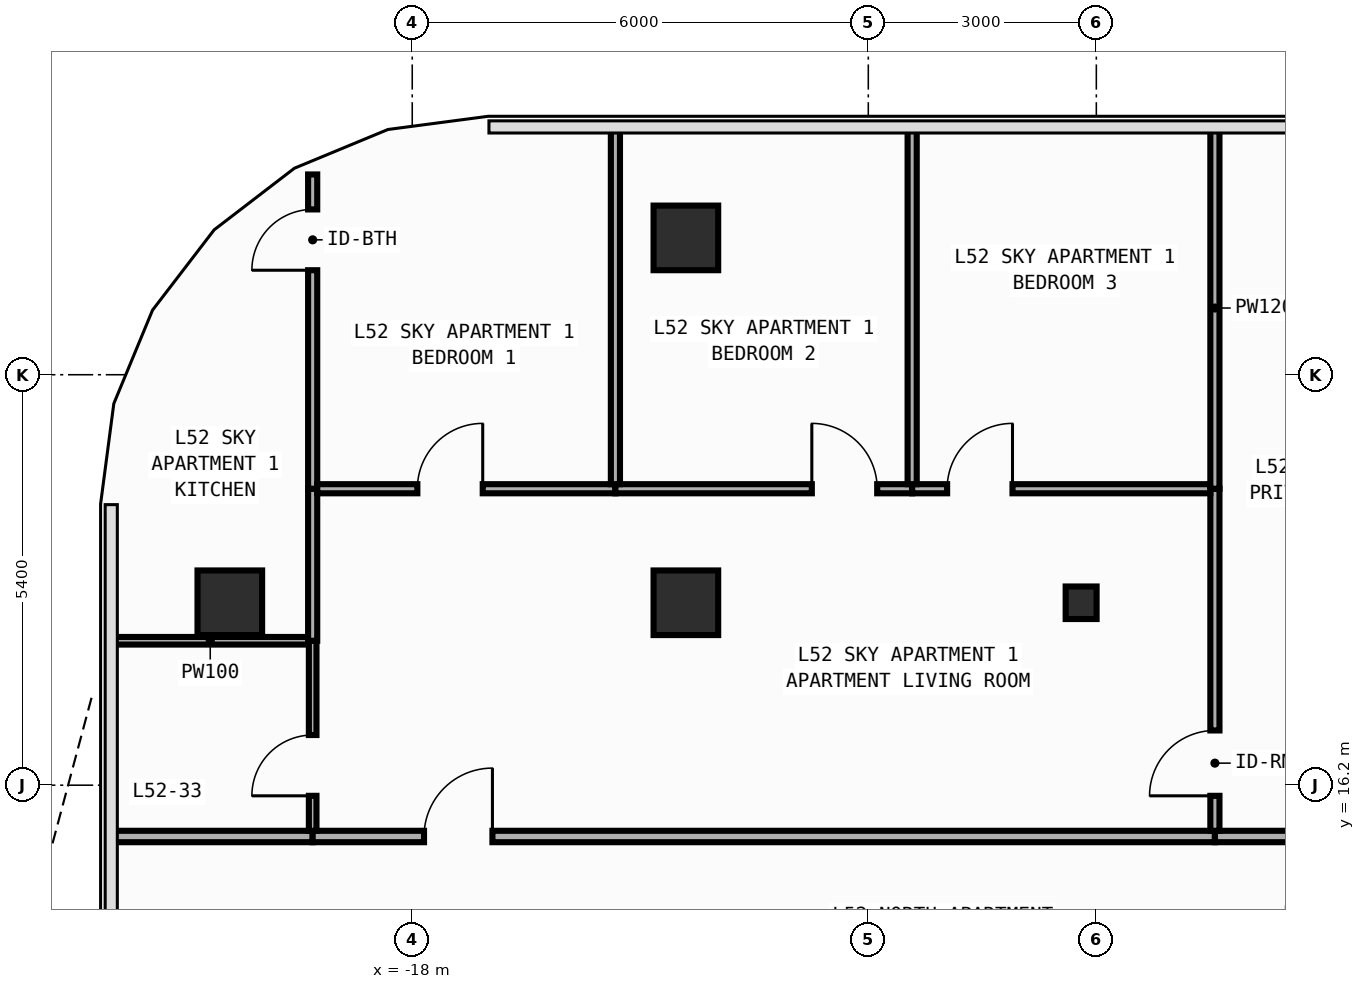
"""IFC4 building model, lengths in metres.
Left out: names, types, materials, properties, quantities, classifications, styles, units other than length and angle.
Written with IfcOpenShell. Run it as: python <this file> out.ifc"""

import sys

from ifc_helpers import new_model, si_unit, direction, frame, frame_2d, origin, origin_2d, place, context, subcontext, project, spatial, rectangle, i_section, extrude, element, fill, save


model = new_model("IFC4")
c1 = context("Model", 3, precision=1e-05, world=origin(), true_north=direction((0.0, 1.0)))
c2 = subcontext(c1, "Body", "Model", "MODEL_VIEW")
j1 = project(units=[si_unit("LENGTHUNIT", "METRE"), si_unit("PLANEANGLEUNIT", "RADIAN")], contexts=[c1])
p1 = place(None, origin())
s1 = spatial("IfcSite", under=j1, at=p1, CompositionType="ELEMENT")
p2 = place(p1, origin())
s2 = spatial("IfcBuilding", under=s1, at=p2, CompositionType="ELEMENT")
p3 = place(p2, frame((0.0, 0.0, 226.0)))
s3 = spatial("IfcBuildingStorey", under=s2, at=p3, CompositionType="ELEMENT", Elevation=226.0)
p4 = place(p3, frame((-9.2, 18.6, 0.0), z_axis=(0.0, 0.0, 1.0), x_axis=(1.0, 0.0, 0.0)))
e1 = element("IfcColumn", 1, at=p4, inside=s3, PredefinedType="COLUMN", context=c2, shape_type="SweptSolid", body=[
    extrude(i_section(OverallWidth=0.407, OverallDepth=0.428, WebThickness=0.02, FlangeThickness=0.035, FilletRadius=0.022, at=origin_2d()), origin(), (0.0, 0.0, 1.0), 3.6),
])
for number, where, z_axis, x_axis in (
    (2, (-20.4, 18.6, 0.0), (0.0, 0.0, 1.0), (1.0, 0.0, 0.0)),
    (3, (-14.4, 18.6, 0.0), (0.0, 0.0, 1.0), (1.0, 0.0, 0.0)),
    (4, (-14.4, 23.4, 0.0), (0.0, 0.0, 1.0), (1.0, 0.0, 0.0)),
):
    element("IfcColumn", number, at=place(p3, frame(where, z_axis=z_axis, x_axis=x_axis)), inside=s3, PredefinedType="COLUMN", context=c2, shape_type="SweptSolid", body=[
        extrude(rectangle(XDim=0.85, YDim=0.85, at=origin_2d()), origin(), (0.0, 0.0, 1.0), 3.6),
    ])
p5 = place(p3, frame((-21.955, 15.525, 0.0), z_axis=(0.0, 0.0, 1.0), x_axis=(1.0, 0.0, 0.0)))
e5 = element("IfcWall", 5, at=p5, inside=s3, PredefinedType="PARTITIONING", context=c2, shape_type="SweptSolid", body=[
    extrude(rectangle(XDim=2.645, YDim=0.15, at=frame_2d((1.323, 0.0))), origin(), (0.0, 0.0, 1.0), 3.34),
])
p6 = place(p3, frame((-19.31, 15.525, 0.0), z_axis=(0.0, 0.0, 1.0), x_axis=(1.0, 0.0, 0.0)))
e6 = element("IfcWall", 6, at=p6, inside=s3, PredefinedType="PARTITIONING", context=c2, shape_type="SweptSolid", body=[
    extrude(rectangle(XDim=11.87, YDim=0.15, at=frame_2d((5.935, 0.0))), origin(), (0.0, 0.0, 1.0), 3.34),
])
p7 = place(p6, frame((1.465, 0.0, 0.0)))
e7 = element("IfcOpeningElement", 7, at=p7, cuts=e6, PredefinedType="OPENING", context=c2, shape_type="SweptSolid", body=[
    extrude(rectangle(XDim=0.9, YDim=2.15, at=frame_2d((0.45, 1.075))), frame((0.0, 0.085, 0.0), z_axis=(0.0, -1.0, 0.0), x_axis=(1.0, 0.0, 0.0)), (0.0, 0.0, 1.0), 0.17),
])
p8 = place(p3, frame((-7.44, 15.525, 0.0), z_axis=(0.0, 0.0, 1.0), x_axis=(1.0, 0.0, 0.0)))
e8 = element("IfcWall", 8, at=p8, inside=s3, PredefinedType="PARTITIONING", context=c2, shape_type="SweptSolid", body=[
    extrude(rectangle(XDim=4.04, YDim=0.15, at=frame_2d((2.02, 0.0))), origin(), (0.0, 0.0, 1.0), 3.34),
])
p9 = place(p3, frame((-21.955, 18.1, 0.0), z_axis=(0.0, 0.0, 1.0), x_axis=(1.0, 0.0, 0.0)))
e9 = element("IfcWall", 9, at=p9, inside=s3, PredefinedType="PARTITIONING", context=c2, shape_type="SweptSolid", body=[
    extrude(rectangle(XDim=2.595, YDim=0.1, at=frame_2d((1.297, 0.0))), origin(), (0.0, 0.0, 1.0), 3.34),
])
p10 = place(p3, frame((-19.31, 15.6, 0.0), z_axis=(0.0, 0.0, 1.0), x_axis=(0.0, 1.0, 0.0)))
e10 = element("IfcWall", 10, at=p10, inside=s3, PredefinedType="PARTITIONING", context=c2, shape_type="SweptSolid", body=[
    extrude(rectangle(XDim=2.5, YDim=0.1, at=frame_2d((1.25, 0.0))), origin(), (0.0, 0.0, 1.0), 3.34),
])
p11 = place(p10, frame((0.46, 0.0, 0.0)))
e11 = element("IfcOpeningElement", 11, at=p11, cuts=e10, PredefinedType="OPENING", context=c2, shape_type="SweptSolid", body=[
    extrude(rectangle(XDim=0.8, YDim=2.1, at=frame_2d((0.4, 1.05))), frame((0.0, 0.06, 0.0), z_axis=(0.0, -1.0, 0.0), x_axis=(1.0, 0.0, 0.0)), (0.0, 0.0, 1.0), 0.12),
])
p12 = place(p3, frame((-19.31, 18.1, 0.0), z_axis=(0.0, 0.0, 1.0), x_axis=(0.0, 1.0, 0.0)))
e12 = element("IfcWall", 12, at=p12, inside=s3, PredefinedType="PARTITIONING", context=c2, shape_type="SweptSolid", body=[
    extrude(rectangle(XDim=2.0, YDim=0.12, at=frame_2d((1.0, 0.0))), origin(), (0.0, 0.0, 1.0), 3.34),
])
p13 = place(p3, frame((-19.31, 20.1, 0.0), z_axis=(0.0, 0.0, 1.0), x_axis=(0.0, 1.0, 0.0)))
e13 = element("IfcWall", 13, at=p13, inside=s3, PredefinedType="PARTITIONING", context=c2, shape_type="SweptSolid", body=[
    extrude(rectangle(XDim=4.135, YDim=0.12, at=frame_2d((2.067, 0.0))), origin(), (0.0, 0.0, 1.0), 3.34),
])
p14 = place(p13, frame((2.875, 0.0, 0.0)))
e14 = element("IfcOpeningElement", 14, at=p14, cuts=e13, PredefinedType="OPENING", context=c2, shape_type="SweptSolid", body=[
    extrude(rectangle(XDim=0.8, YDim=2.1, at=frame_2d((0.4, 1.05))), frame((0.0, 0.07, 0.0), z_axis=(0.0, -1.0, 0.0), x_axis=(1.0, 0.0, 0.0)), (0.0, 0.0, 1.0), 0.14),
])
p15 = place(p3, frame((-7.44, 15.6, 0.0), z_axis=(0.0, 0.0, 1.0), x_axis=(0.0, 1.0, 0.0)))
e15 = element("IfcWall", 15, at=p15, inside=s3, PredefinedType="PARTITIONING", context=c2, shape_type="SweptSolid", body=[
    extrude(rectangle(XDim=4.5, YDim=0.12, at=frame_2d((2.25, 0.0))), origin(), (0.0, 0.0, 1.0), 3.34),
])
p16 = place(p15, frame((0.46, 0.0, 0.0)))
e16 = element("IfcOpeningElement", 16, at=p16, cuts=e15, PredefinedType="OPENING", context=c2, shape_type="SweptSolid", body=[
    extrude(rectangle(XDim=0.86, YDim=2.15, at=frame_2d((0.43, 1.075))), frame((0.0, 0.07, 0.0), z_axis=(0.0, -1.0, 0.0), x_axis=(1.0, 0.0, 0.0)), (0.0, 0.0, 1.0), 0.14),
])
p17 = place(p3, frame((-19.25, 20.1, 0.0), z_axis=(0.0, 0.0, 1.0), x_axis=(1.0, 0.0, 0.0)))
e17 = element("IfcWall", 17, at=p17, inside=s3, PredefinedType="PARTITIONING", context=c2, shape_type="SweptSolid", body=[
    extrude(rectangle(XDim=3.923, YDim=0.12, at=frame_2d((1.961, 0.0))), origin(), (0.0, 0.0, 1.0), 3.34),
])
p18 = place(p17, frame((1.317, 0.0, 0.0)))
e18 = element("IfcOpeningElement", 18, at=p18, cuts=e17, PredefinedType="OPENING", context=c2, shape_type="SweptSolid", body=[
    extrude(rectangle(XDim=0.86, YDim=2.15, at=frame_2d((0.43, 1.075))), frame((0.0, 0.07, 0.0), z_axis=(0.0, -1.0, 0.0), x_axis=(1.0, 0.0, 0.0)), (0.0, 0.0, 1.0), 0.14),
])
p19 = place(p3, frame((-15.327, 20.1, 0.0), z_axis=(0.0, 0.0, 1.0), x_axis=(1.0, 0.0, 0.0)))
e19 = element("IfcWall", 19, at=p19, inside=s3, PredefinedType="PARTITIONING", context=c2, shape_type="SweptSolid", body=[
    extrude(rectangle(XDim=3.904, YDim=0.12, at=frame_2d((1.952, 0.0))), origin(), (0.0, 0.0, 1.0), 3.34),
])
p20 = place(p19, frame((2.584, 0.0, 0.0)))
e20 = element("IfcOpeningElement", 20, at=p20, cuts=e19, PredefinedType="OPENING", context=c2, shape_type="SweptSolid", body=[
    extrude(rectangle(XDim=0.86, YDim=2.15, at=frame_2d((0.43, 1.075))), frame((0.0, 0.07, 0.0), z_axis=(0.0, -1.0, 0.0), x_axis=(1.0, 0.0, 0.0)), (0.0, 0.0, 1.0), 0.14),
])
p21 = place(p3, frame((-11.423, 20.1, 0.0), z_axis=(0.0, 0.0, 1.0), x_axis=(1.0, 0.0, 0.0)))
e21 = element("IfcWall", 21, at=p21, inside=s3, PredefinedType="PARTITIONING", context=c2, shape_type="SweptSolid", body=[
    extrude(rectangle(XDim=3.923, YDim=0.12, at=frame_2d((1.961, 0.0))), origin(), (0.0, 0.0, 1.0), 3.34),
])
p22 = place(p21, frame((0.46, 0.0, 0.0)))
e22 = element("IfcOpeningElement", 22, at=p22, cuts=e21, PredefinedType="OPENING", context=c2, shape_type="SweptSolid", body=[
    extrude(rectangle(XDim=0.86, YDim=2.15, at=frame_2d((0.43, 1.075))), frame((0.0, 0.07, 0.0), z_axis=(0.0, -1.0, 0.0), x_axis=(1.0, 0.0, 0.0)), (0.0, 0.0, 1.0), 0.14),
])
p23 = place(p3, frame((-7.44, 20.1, 0.0), z_axis=(0.0, 0.0, 1.0), x_axis=(0.0, 1.0, 0.0)))
e23 = element("IfcWall", 23, at=p23, inside=s3, PredefinedType="PARTITIONING", context=c2, shape_type="SweptSolid", body=[
    extrude(rectangle(XDim=4.755, YDim=0.12, at=frame_2d((2.377, 0.0))), origin(), (0.0, 0.0, 1.0), 3.34),
])
for number, where, z_axis, x_axis in (
    (24, (-15.327, 20.16, 0.0), (0.0, 0.0, 1.0), (0.0, 1.0, 0.0)),
    (25, (-11.423, 20.16, 0.0), (0.0, 0.0, 1.0), (0.0, 1.0, 0.0)),
):
    element("IfcWall", number, at=place(p3, frame(where, z_axis=z_axis, x_axis=x_axis)), inside=s3, PredefinedType="PARTITIONING", context=c2, shape_type="SweptSolid", body=[
        extrude(rectangle(XDim=4.695, YDim=0.12, at=frame_2d((2.348, 0.0))), origin(), (0.0, 0.0, 1.0), 3.34),
    ])
p24 = place(p7, origin())
e26 = element("IfcDoor", 26, at=p24, inside=s3, OperationType="SINGLE_SWING_RIGHT", PredefinedType="DOOR", context=c2, shape_type="SweptSolid", body=[
    extrude(rectangle(XDim=0.9, YDim=2.15, at=frame_2d((0.45, 1.075))), frame((0.0, 0.025, 0.0), z_axis=(0.0, -1.0, 0.0), x_axis=(1.0, 0.0, 0.0)), (0.0, 0.0, 1.0), 0.05),
])
fill(e7, e26)
p25 = place(p11, origin())
e27 = element("IfcDoor", 27, at=p25, inside=s3, OperationType="SINGLE_SWING_LEFT", PredefinedType="DOOR", context=c2, shape_type="SweptSolid", body=[
    extrude(rectangle(XDim=0.8, YDim=2.1, at=frame_2d((0.4, 1.05))), frame((0.0, 0.025, 0.0), z_axis=(0.0, -1.0, 0.0), x_axis=(1.0, 0.0, 0.0)), (0.0, 0.0, 1.0), 0.05),
])
fill(e11, e27)
p26 = place(p16, origin())
e28 = element("IfcDoor", 28, at=p26, inside=s3, OperationType="SINGLE_SWING_LEFT", PredefinedType="DOOR", context=c2, shape_type="SweptSolid", body=[
    extrude(rectangle(XDim=0.86, YDim=2.15, at=frame_2d((0.43, 1.075))), frame((0.0, 0.025, 0.0), z_axis=(0.0, -1.0, 0.0), x_axis=(1.0, 0.0, 0.0)), (0.0, 0.0, 1.0), 0.05),
])
fill(e16, e28)
p27 = place(p18, origin())
e29 = element("IfcDoor", 29, at=p27, inside=s3, OperationType="SINGLE_SWING_RIGHT", PredefinedType="DOOR", context=c2, shape_type="SweptSolid", body=[
    extrude(rectangle(XDim=0.86, YDim=2.15, at=frame_2d((0.43, 1.075))), frame((0.0, 0.025, 0.0), z_axis=(0.0, -1.0, 0.0), x_axis=(1.0, 0.0, 0.0)), (0.0, 0.0, 1.0), 0.05),
])
fill(e18, e29)
p28 = place(p20, origin())
e30 = element("IfcDoor", 30, at=p28, inside=s3, OperationType="SINGLE_SWING_LEFT", PredefinedType="DOOR", context=c2, shape_type="SweptSolid", body=[
    extrude(rectangle(XDim=0.86, YDim=2.15, at=frame_2d((0.43, 1.075))), frame((0.0, 0.025, 0.0), z_axis=(0.0, -1.0, 0.0), x_axis=(1.0, 0.0, 0.0)), (0.0, 0.0, 1.0), 0.05),
])
fill(e20, e30)
p29 = place(p22, origin())
e31 = element("IfcDoor", 31, at=p29, inside=s3, OperationType="SINGLE_SWING_RIGHT", PredefinedType="DOOR", context=c2, shape_type="SweptSolid", body=[
    extrude(rectangle(XDim=0.86, YDim=2.15, at=frame_2d((0.43, 1.075))), frame((0.0, 0.025, 0.0), z_axis=(0.0, -1.0, 0.0), x_axis=(1.0, 0.0, 0.0)), (0.0, 0.0, 1.0), 0.05),
])
fill(e22, e31)
p30 = place(p14, origin())
e32 = element("IfcDoor", 32, at=p30, inside=s3, OperationType="SINGLE_SWING_LEFT", PredefinedType="DOOR", context=c2, shape_type="SweptSolid", body=[
    extrude(rectangle(XDim=0.8, YDim=2.1, at=frame_2d((0.4, 1.05))), frame((0.0, 0.025, 0.0), z_axis=(0.0, -1.0, 0.0), x_axis=(1.0, 0.0, 0.0)), (0.0, 0.0, 1.0), 0.05),
])
fill(e14, e32)
save(model, sys.argv[1])
